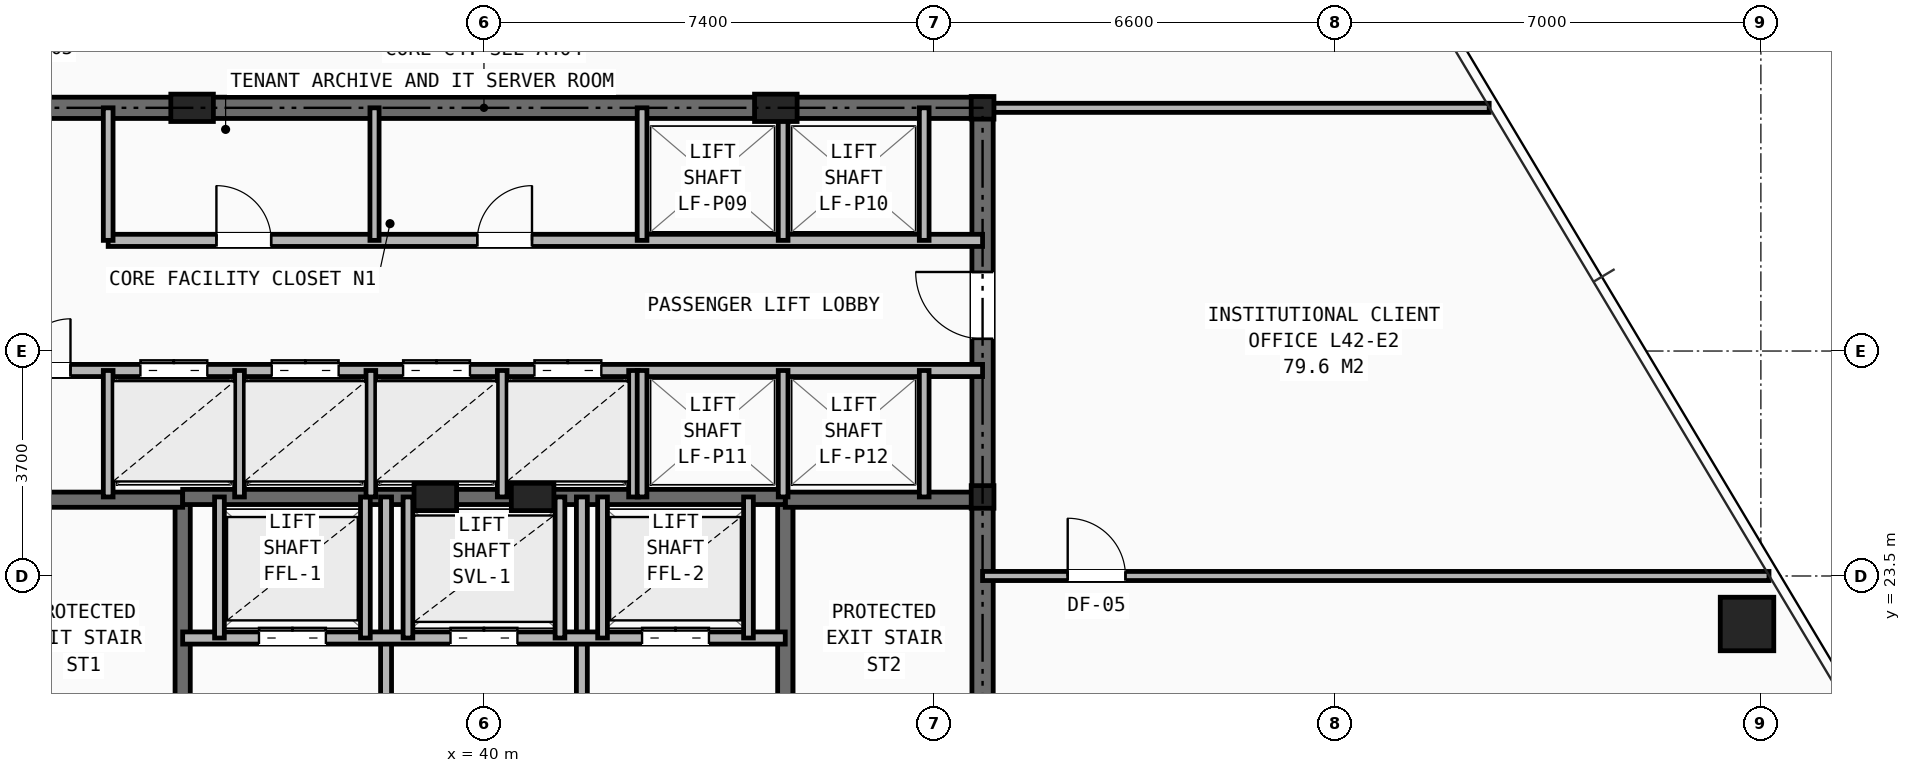
"""IFC4 building model, lengths in metres.
Left out: names, types, materials, properties, quantities, classifications, styles, units other than length and angle.
Written with IfcOpenShell. Run it as: python <this file> out.ifc"""

import sys

from ifc_helpers import new_model, si_unit, direction, frame, frame_2d, origin, origin_2d, place, context, subcontext, project, spatial, rectangle, hollow_rectangle, i_section, extrude, element, fill, save


model = new_model("IFC4")
c1 = context("Model", 3, precision=1e-05, world=origin(), true_north=direction((0.0, 1.0)))
c2 = subcontext(c1, "Body", "Model", "MODEL_VIEW")
j1 = project(units=[si_unit("LENGTHUNIT", "METRE"), si_unit("PLANEANGLEUNIT", "RADIAN")], contexts=[c1])
p1 = place(None, origin())
s1 = spatial("IfcSite", under=j1, at=p1, CompositionType="ELEMENT")
p2 = place(p1, origin())
s2 = spatial("IfcBuilding", under=s1, at=p2, CompositionType="ELEMENT")
p3 = place(p2, frame((0.0, 0.0, 147.05)))
s3 = spatial("IfcBuildingStorey", under=s2, at=p3, CompositionType="ELEMENT", Elevation=147.05)
for number, where, z_axis, x_axis in (
    (1, (48.2, 24.8, 0.0), (0.0, 0.0, 1.0), (1.0, 0.0, 0.0)),
    (2, (48.2, 31.2, 0.0), (0.0, 0.0, 1.0), (1.0, 0.0, 0.0)),
):
    element("IfcColumn", number, at=place(p3, frame(where, z_axis=z_axis, x_axis=x_axis)), inside=s3, PredefinedType="COLUMN", context=c2, shape_type="SweptSolid", body=[
        extrude(i_section(OverallWidth=0.374, OverallDepth=0.372, WebThickness=0.016, FlangeThickness=0.026, at=origin_2d()), origin(), (0.0, 0.0, 1.0), 3.45),
    ])
for number, where, z_axis, x_axis in (
    (3, (35.2, 31.2, 0.0), (0.0, 0.0, 1.0), (1.0, 0.0, 0.0)),
    (4, (44.8, 31.2, 0.0), (0.0, 0.0, 1.0), (1.0, 0.0, 0.0)),
    (5, (39.2, 24.8, 0.0), (0.0, 0.0, 1.0), (1.0, 0.0, 0.0)),
    (6, (40.8, 24.8, 0.0), (0.0, 0.0, 1.0), (1.0, 0.0, 0.0)),
):
    element("IfcColumn", number, at=place(p3, frame(where, z_axis=z_axis, x_axis=x_axis)), inside=s3, PredefinedType="PILASTER", context=c2, shape_type="SweptSolid", body=[
        extrude(rectangle(XDim=0.7, YDim=0.45, at=origin_2d()), origin(), (0.0, 0.0, 1.0), 3.45),
    ])
p4 = place(p3, frame((60.772, 22.711, 0.0), z_axis=(0.0, 0.0, 1.0), x_axis=(1.0, 0.0, 0.0)))
e7 = element("IfcColumn", 7, at=p4, inside=s3, PredefinedType="COLUMN", context=c2, shape_type="SweptSolid", body=[
    extrude(hollow_rectangle(XDim=0.88, YDim=0.88, WallThickness=0.06, at=origin_2d()), origin(), (0.0, 0.0, 1.0), 3.45),
])
p5 = place(p3, frame((31.8, 31.2, 0.0), z_axis=(0.0, 0.0, 1.0), x_axis=(1.0, 0.0, 0.0)))
e8 = element("IfcWall", 8, at=p5, inside=s3, PredefinedType="SHEAR", context=c2, shape_type="SweptSolid", body=[
    extrude(rectangle(XDim=16.4, YDim=0.35, at=frame_2d((8.2, 0.0))), origin(), (0.0, 0.0, 1.0), 3.21),
])
p6 = place(p3, frame((48.2, 16.4, 0.0), z_axis=(0.0, 0.0, 1.0), x_axis=(0.0, 1.0, 0.0)))
e9 = element("IfcWall", 9, at=p6, inside=s3, PredefinedType="SHEAR", context=c2, shape_type="SweptSolid", body=[
    extrude(rectangle(XDim=14.8, YDim=0.35, at=frame_2d((7.4, 0.0))), origin(), (0.0, 0.0, 1.0), 3.21),
])
p7 = place(p6, frame((11.0, 0.0, 0.0)))
e10 = element("IfcOpeningElement", 10, at=p7, cuts=e9, PredefinedType="OPENING", context=c2, shape_type="SweptSolid", body=[
    extrude(rectangle(XDim=1.1, YDim=2.15, at=frame_2d((0.55, 1.075))), frame((0.0, 0.185, 0.0), z_axis=(0.0, -1.0, 0.0), x_axis=(1.0, 0.0, 0.0)), (0.0, 0.0, 1.0), 0.37),
])
p8 = place(p3, frame((35.045, 16.4, 0.0), z_axis=(0.0, 0.0, 1.0), x_axis=(0.0, 1.0, 0.0)))
e11 = element("IfcWall", 11, at=p8, inside=s3, PredefinedType="SHEAR", context=c2, shape_type="SweptSolid", body=[
    extrude(rectangle(XDim=8.4, YDim=0.25, at=frame_2d((4.2, 0.0))), origin(), (0.0, 0.0, 1.0), 3.21),
])
p9 = place(p8, frame((0.45, 0.0, 0.0)))
e12 = element("IfcOpeningElement", 12, at=p9, cuts=e11, PredefinedType="OPENING", context=c2, shape_type="SweptSolid", body=[
    extrude(rectangle(XDim=0.95, YDim=2.1, at=frame_2d((0.475, 1.05))), frame((0.0, 0.135, 0.0), z_axis=(0.0, -1.0, 0.0), x_axis=(1.0, 0.0, 0.0)), (0.0, 0.0, 1.0), 0.27),
])
p10 = place(p3, frame((31.8, 24.755, 0.0), z_axis=(0.0, 0.0, 1.0), x_axis=(1.0, 0.0, 0.0)))
e13 = element("IfcWall", 13, at=p10, inside=s3, PredefinedType="SHEAR", context=c2, shape_type="SweptSolid", body=[
    extrude(rectangle(XDim=3.245, YDim=0.25, at=frame_2d((1.623, 0.0))), origin(), (0.0, 0.0, 1.0), 3.21),
])
p11 = place(p3, frame((44.955, 16.4, 0.0), z_axis=(0.0, 0.0, 1.0), x_axis=(0.0, 1.0, 0.0)))
e14 = element("IfcWall", 14, at=p11, inside=s3, PredefinedType="SHEAR", context=c2, shape_type="SweptSolid", body=[
    extrude(rectangle(XDim=8.4, YDim=0.25, at=frame_2d((4.2, 0.0))), origin(), (0.0, 0.0, 1.0), 3.21),
])
p12 = place(p11, frame((0.45, 0.0, 0.0)))
e15 = element("IfcOpeningElement", 15, at=p12, cuts=e14, PredefinedType="OPENING", context=c2, shape_type="SweptSolid", body=[
    extrude(rectangle(XDim=0.95, YDim=2.1, at=frame_2d((0.475, 1.05))), frame((0.0, 0.135, 0.0), z_axis=(0.0, -1.0, 0.0), x_axis=(1.0, 0.0, 0.0)), (0.0, 0.0, 1.0), 0.27),
])
p13 = place(p3, frame((44.955, 24.755, 0.0), z_axis=(0.0, 0.0, 1.0), x_axis=(1.0, 0.0, 0.0)))
e16 = element("IfcWall", 16, at=p13, inside=s3, PredefinedType="SHEAR", context=c2, shape_type="SweptSolid", body=[
    extrude(rectangle(XDim=3.245, YDim=0.25, at=frame_2d((1.623, 0.0))), origin(), (0.0, 0.0, 1.0), 3.21),
])
p14 = place(p3, frame((35.045, 24.8, 0.0), z_axis=(0.0, 0.0, 1.0), x_axis=(1.0, 0.0, 0.0)))
e17 = element("IfcWall", 17, at=p14, inside=s3, PredefinedType="SHEAR", context=c2, shape_type="SweptSolid", body=[
    extrude(rectangle(XDim=9.91, YDim=0.25, at=frame_2d((4.955, 0.0))), origin(), (0.0, 0.0, 1.0), 3.21),
])
p15 = place(p3, frame((38.39, 16.4, 0.0), z_axis=(0.0, 0.0, 1.0), x_axis=(0.0, 1.0, 0.0)))
e18 = element("IfcWall", 18, at=p15, inside=s3, PredefinedType="PARTITIONING", context=c2, shape_type="SweptSolid", body=[
    extrude(rectangle(XDim=8.4, YDim=0.18, at=frame_2d((4.2, 0.0))), origin(), (0.0, 0.0, 1.0), 2.661),
])
p16 = place(p15, frame((3.85, 0.0, 0.0)))
e19 = element("IfcOpeningElement", 19, at=p16, cuts=e18, PredefinedType="OPENING", context=c2, shape_type="SweptSolid", body=[
    extrude(rectangle(XDim=0.95, YDim=2.1, at=frame_2d((0.475, 1.05))), frame((0.0, 0.1, 0.0), z_axis=(0.0, -1.0, 0.0), x_axis=(1.0, 0.0, 0.0)), (0.0, 0.0, 1.0), 0.2),
])
p17 = place(p3, frame((41.61, 16.4, 0.0), z_axis=(0.0, 0.0, 1.0), x_axis=(0.0, 1.0, 0.0)))
e20 = element("IfcWall", 20, at=p17, inside=s3, PredefinedType="PARTITIONING", context=c2, shape_type="SweptSolid", body=[
    extrude(rectangle(XDim=8.4, YDim=0.18, at=frame_2d((4.2, 0.0))), origin(), (0.0, 0.0, 1.0), 2.661),
])
p18 = place(p3, frame((35.045, 22.48, 0.0), z_axis=(0.0, 0.0, 1.0), x_axis=(1.0, 0.0, 0.0)))
e21 = element("IfcWall", 21, at=p18, inside=s3, PredefinedType="SOLIDWALL", context=c2, shape_type="SweptSolid", body=[
    extrude(rectangle(XDim=9.91, YDim=0.2, at=frame_2d((4.955, 0.0))), origin(), (0.0, 0.0, 1.0), 3.21),
])
p19 = place(p18, frame((1.255, 0.0, 0.0)))
e22 = element("IfcOpeningElement", 22, at=p19, cuts=e21, PredefinedType="OPENING", context=c2, shape_type="SweptSolid", body=[
    extrude(rectangle(XDim=1.1, YDim=2.15, at=frame_2d((0.55, 1.075))), frame((0.0, 0.11, 0.0), z_axis=(0.0, -1.0, 0.0), x_axis=(1.0, 0.0, 0.0)), (0.0, 0.0, 1.0), 0.22),
])
p20 = place(p18, frame((7.555, 0.0, 0.0)))
e23 = element("IfcOpeningElement", 23, at=p20, cuts=e21, PredefinedType="OPENING", context=c2, shape_type="SweptSolid", body=[
    extrude(rectangle(XDim=1.1, YDim=2.15, at=frame_2d((0.55, 1.075))), frame((0.0, 0.11, 0.0), z_axis=(0.0, -1.0, 0.0), x_axis=(1.0, 0.0, 0.0)), (0.0, 0.0, 1.0), 0.22),
])
p21 = place(p18, frame((4.405, 0.0, 0.0)))
e24 = element("IfcOpeningElement", 24, at=p21, cuts=e21, PredefinedType="OPENING", context=c2, shape_type="SweptSolid", body=[
    extrude(rectangle(XDim=1.1, YDim=2.15, at=frame_2d((0.55, 1.075))), frame((0.0, 0.11, 0.0), z_axis=(0.0, -1.0, 0.0), x_axis=(1.0, 0.0, 0.0)), (0.0, 0.0, 1.0), 0.22),
])
for number, where, z_axis, x_axis in (
    (25, (35.65, 22.48, 0.0), (0.0, 0.0, 1.0), (0.0, 1.0, 0.0)),
    (26, (38.05, 22.48, 0.0), (0.0, 0.0, 1.0), (0.0, 1.0, 0.0)),
    (27, (41.95, 22.48, 0.0), (0.0, 0.0, 1.0), (0.0, 1.0, 0.0)),
    (28, (44.35, 22.48, 0.0), (0.0, 0.0, 1.0), (0.0, 1.0, 0.0)),
    (29, (38.75, 22.48, 0.0), (0.0, 0.0, 1.0), (0.0, 1.0, 0.0)),
    (30, (41.25, 22.48, 0.0), (0.0, 0.0, 1.0), (0.0, 1.0, 0.0)),
):
    element("IfcWall", number, at=place(p3, frame(where, z_axis=z_axis, x_axis=x_axis)), inside=s3, PredefinedType="SOLIDWALL", context=c2, shape_type="SweptSolid", body=[
        extrude(rectangle(XDim=2.32, YDim=0.16, at=frame_2d((1.16, 0.0))), origin(), (0.0, 0.0, 1.0), 3.21),
    ])
p22 = place(p3, frame((33.82, 29.02, 0.0), z_axis=(0.0, 0.0, 1.0), x_axis=(1.0, 0.0, 0.0)))
e31 = element("IfcWall", 31, at=p22, inside=s3, PredefinedType="SOLIDWALL", context=c2, shape_type="SweptSolid", body=[
    extrude(rectangle(XDim=14.38, YDim=0.2, at=frame_2d((7.19, 0.0))), origin(), (0.0, 0.0, 1.0), 2.661),
])
p23 = place(p22, frame((1.78, 0.0, 0.0)))
e32 = element("IfcOpeningElement", 32, at=p23, cuts=e31, PredefinedType="OPENING", context=c2, shape_type="SweptSolid", body=[
    extrude(rectangle(XDim=0.9, YDim=2.1, at=frame_2d((0.45, 1.05))), frame((0.0, 0.11, 0.0), z_axis=(0.0, -1.0, 0.0), x_axis=(1.0, 0.0, 0.0)), (0.0, 0.0, 1.0), 0.22),
])
p24 = place(p22, frame((6.07, 0.0, 0.0)))
e33 = element("IfcOpeningElement", 33, at=p24, cuts=e31, PredefinedType="OPENING", context=c2, shape_type="SweptSolid", body=[
    extrude(rectangle(XDim=0.9, YDim=2.1, at=frame_2d((0.45, 1.05))), frame((0.0, 0.11, 0.0), z_axis=(0.0, -1.0, 0.0), x_axis=(1.0, 0.0, 0.0)), (0.0, 0.0, 1.0), 0.22),
])
p25 = place(p3, frame((31.8, 26.88, 0.0), z_axis=(0.0, 0.0, 1.0), x_axis=(1.0, 0.0, 0.0)))
e34 = element("IfcWall", 34, at=p25, inside=s3, PredefinedType="SOLIDWALL", context=c2, shape_type="SweptSolid", body=[
    extrude(rectangle(XDim=16.4, YDim=0.2, at=frame_2d((8.2, 0.0))), origin(), (0.0, 0.0, 1.0), 2.661),
])
p26 = place(p25, frame((0.55, 0.0, 0.0)))
e35 = element("IfcOpeningElement", 35, at=p26, cuts=e34, PredefinedType="OPENING", context=c2, shape_type="SweptSolid", body=[
    extrude(rectangle(XDim=0.85, YDim=2.05, at=frame_2d((0.425, 1.025))), frame((0.0, 0.11, 0.0), z_axis=(0.0, -1.0, 0.0), x_axis=(1.0, 0.0, 0.0)), (0.0, 0.0, 1.0), 0.22),
])
p27 = place(p25, frame((2.55, 0.0, 0.0)))
e36 = element("IfcOpeningElement", 36, at=p27, cuts=e34, PredefinedType="OPENING", context=c2, shape_type="SweptSolid", body=[
    extrude(rectangle(XDim=1.1, YDim=2.15, at=frame_2d((0.55, 1.075))), frame((0.0, 0.11, 0.0), z_axis=(0.0, -1.0, 0.0), x_axis=(1.0, 0.0, 0.0)), (0.0, 0.0, 1.0), 0.22),
])
p28 = place(p25, frame((4.71, 0.0, 0.0)))
e37 = element("IfcOpeningElement", 37, at=p28, cuts=e34, PredefinedType="OPENING", context=c2, shape_type="SweptSolid", body=[
    extrude(rectangle(XDim=1.1, YDim=2.15, at=frame_2d((0.55, 1.075))), frame((0.0, 0.11, 0.0), z_axis=(0.0, -1.0, 0.0), x_axis=(1.0, 0.0, 0.0)), (0.0, 0.0, 1.0), 0.22),
])
p29 = place(p25, frame((6.87, 0.0, 0.0)))
e38 = element("IfcOpeningElement", 38, at=p29, cuts=e34, PredefinedType="OPENING", context=c2, shape_type="SweptSolid", body=[
    extrude(rectangle(XDim=1.1, YDim=2.15, at=frame_2d((0.55, 1.075))), frame((0.0, 0.11, 0.0), z_axis=(0.0, -1.0, 0.0), x_axis=(1.0, 0.0, 0.0)), (0.0, 0.0, 1.0), 0.22),
])
p30 = place(p25, frame((9.03, 0.0, 0.0)))
e39 = element("IfcOpeningElement", 39, at=p30, cuts=e34, PredefinedType="OPENING", context=c2, shape_type="SweptSolid", body=[
    extrude(rectangle(XDim=1.1, YDim=2.15, at=frame_2d((0.55, 1.075))), frame((0.0, 0.11, 0.0), z_axis=(0.0, -1.0, 0.0), x_axis=(1.0, 0.0, 0.0)), (0.0, 0.0, 1.0), 0.22),
])
p31 = place(p3, frame((33.82, 29.02, 0.0), z_axis=(0.0, 0.0, 1.0), x_axis=(0.0, 1.0, 0.0)))
e40 = element("IfcWall", 40, at=p31, inside=s3, PredefinedType="SOLIDWALL", context=c2, shape_type="SweptSolid", body=[
    extrude(rectangle(XDim=2.18, YDim=0.16, at=frame_2d((1.09, 0.0))), origin(), (0.0, 0.0, 1.0), 2.661),
])
p32 = place(p3, frame((33.82, 24.8, 0.0), z_axis=(0.0, 0.0, 1.0), x_axis=(0.0, 1.0, 0.0)))
e41 = element("IfcWall", 41, at=p32, inside=s3, PredefinedType="SOLIDWALL", context=c2, shape_type="SweptSolid", body=[
    extrude(rectangle(XDim=2.08, YDim=0.16, at=frame_2d((1.04, 0.0))), origin(), (0.0, 0.0, 1.0), 3.21),
])
p33 = place(p3, frame((38.2, 29.02, 0.0), z_axis=(0.0, 0.0, 1.0), x_axis=(0.0, 1.0, 0.0)))
e42 = element("IfcWall", 42, at=p33, inside=s3, PredefinedType="PARTITIONING", context=c2, shape_type="SweptSolid", body=[
    extrude(rectangle(XDim=2.18, YDim=0.15, at=frame_2d((1.09, 0.0))), origin(), (0.0, 0.0, 1.0), 2.661),
])
for number, where, z_axis, x_axis in (
    (43, (35.98, 24.8, 0.0), (0.0, 0.0, 1.0), (0.0, 1.0, 0.0)),
    (44, (38.14, 24.8, 0.0), (0.0, 0.0, 1.0), (0.0, 1.0, 0.0)),
    (45, (40.3, 24.8, 0.0), (0.0, 0.0, 1.0), (0.0, 1.0, 0.0)),
    (46, (42.46, 24.8, 0.0), (0.0, 0.0, 1.0), (0.0, 1.0, 0.0)),
):
    element("IfcWall", number, at=place(p3, frame(where, z_axis=z_axis, x_axis=x_axis)), inside=s3, PredefinedType="SOLIDWALL", context=c2, shape_type="SweptSolid", body=[
        extrude(rectangle(XDim=2.08, YDim=0.16, at=frame_2d((1.04, 0.0))), origin(), (0.0, 0.0, 1.0), 3.21),
    ])
for number, where, z_axis, x_axis in (
    (47, (42.6, 29.02, 0.0), (0.0, 0.0, 1.0), (0.0, 1.0, 0.0)),
    (48, (44.92, 29.02, 0.0), (0.0, 0.0, 1.0), (0.0, 1.0, 0.0)),
    (49, (47.24, 29.02, 0.0), (0.0, 0.0, 1.0), (0.0, 1.0, 0.0)),
):
    element("IfcWall", number, at=place(p3, frame(where, z_axis=z_axis, x_axis=x_axis)), inside=s3, PredefinedType="SOLIDWALL", context=c2, shape_type="SweptSolid", body=[
        extrude(rectangle(XDim=2.18, YDim=0.16, at=frame_2d((1.09, 0.0))), origin(), (0.0, 0.0, 1.0), 2.661),
    ])
for number, where, z_axis, x_axis in (
    (50, (42.6, 24.8, 0.0), (0.0, 0.0, 1.0), (0.0, 1.0, 0.0)),
    (51, (44.92, 24.8, 0.0), (0.0, 0.0, 1.0), (0.0, 1.0, 0.0)),
    (52, (47.24, 24.8, 0.0), (0.0, 0.0, 1.0), (0.0, 1.0, 0.0)),
):
    element("IfcWall", number, at=place(p3, frame(where, z_axis=z_axis, x_axis=x_axis)), inside=s3, PredefinedType="SOLIDWALL", context=c2, shape_type="SweptSolid", body=[
        extrude(rectangle(XDim=2.08, YDim=0.16, at=frame_2d((1.04, 0.0))), origin(), (0.0, 0.0, 1.0), 3.21),
    ])
p34 = place(p3, frame((48.2, 31.2, 0.0), z_axis=(0.0, 0.0, 1.0), x_axis=(1.0, 0.0, 0.0)))
e53 = element("IfcWall", 53, at=p34, inside=s3, PredefinedType="PARTITIONING", context=c2, shape_type="SweptSolid", body=[
    extrude(rectangle(XDim=8.332, YDim=0.15, at=frame_2d((4.166, 0.0))), origin(), (0.0, 0.0, 1.0), 2.225),
])
p35 = place(p3, frame((48.2, 23.5, 0.0), z_axis=(0.0, 0.0, 1.0), x_axis=(1.0, 0.0, 0.0)))
e54 = element("IfcWall", 54, at=p35, inside=s3, PredefinedType="PARTITIONING", context=c2, shape_type="SweptSolid", body=[
    extrude(rectangle(XDim=12.933, YDim=0.15, at=frame_2d((6.467, 0.0))), origin(), (0.0, 0.0, 1.0), 2.589),
])
p36 = place(p35, frame((1.4, 0.0, 0.0)))
e55 = element("IfcOpeningElement", 55, at=p36, cuts=e54, PredefinedType="OPENING", context=c2, shape_type="SweptSolid", body=[
    extrude(rectangle(XDim=0.95, YDim=2.1, at=frame_2d((0.475, 1.05))), frame((0.0, 0.085, 0.0), z_axis=(0.0, -1.0, 0.0), x_axis=(1.0, 0.0, 0.0)), (0.0, 0.0, 1.0), 0.17),
])
p37 = place(p19, origin())
e56 = element("IfcDoor", 56, at=p37, inside=s3, OperationType="DOUBLE_DOOR_SLIDING", PredefinedType="DOOR", context=c2, shape_type="SweptSolid", body=[
    extrude(rectangle(XDim=1.1, YDim=2.15, at=frame_2d((0.55, 1.075))), frame((0.0, 0.025, 0.0), z_axis=(0.0, -1.0, 0.0), x_axis=(1.0, 0.0, 0.0)), (0.0, 0.0, 1.0), 0.05),
])
fill(e22, e56)
p38 = place(p20, origin())
e57 = element("IfcDoor", 57, at=p38, inside=s3, OperationType="DOUBLE_DOOR_SLIDING", PredefinedType="DOOR", context=c2, shape_type="SweptSolid", body=[
    extrude(rectangle(XDim=1.1, YDim=2.15, at=frame_2d((0.55, 1.075))), frame((0.0, 0.025, 0.0), z_axis=(0.0, -1.0, 0.0), x_axis=(1.0, 0.0, 0.0)), (0.0, 0.0, 1.0), 0.05),
])
fill(e23, e57)
p39 = place(p21, origin())
e58 = element("IfcDoor", 58, at=p39, inside=s3, OperationType="DOUBLE_DOOR_SLIDING", PredefinedType="DOOR", context=c2, shape_type="SweptSolid", body=[
    extrude(rectangle(XDim=1.1, YDim=2.15, at=frame_2d((0.55, 1.075))), frame((0.0, 0.025, 0.0), z_axis=(0.0, -1.0, 0.0), x_axis=(1.0, 0.0, 0.0)), (0.0, 0.0, 1.0), 0.05),
])
fill(e24, e58)
p40 = place(p26, origin())
e59 = element("IfcDoor", 59, at=p40, inside=s3, OperationType="SINGLE_SWING_RIGHT", PredefinedType="DOOR", context=c2, shape_type="SweptSolid", body=[
    extrude(rectangle(XDim=0.85, YDim=2.05, at=frame_2d((0.425, 1.025))), frame((0.0, 0.025, 0.0), z_axis=(0.0, -1.0, 0.0), x_axis=(1.0, 0.0, 0.0)), (0.0, 0.0, 1.0), 0.05),
])
fill(e35, e59)
p41 = place(p7, origin())
e60 = element("IfcDoor", 60, at=p41, inside=s3, OperationType="SINGLE_SWING_RIGHT", PredefinedType="DOOR", context=c2, shape_type="SweptSolid", body=[
    extrude(rectangle(XDim=1.1, YDim=2.15, at=frame_2d((0.55, 1.075))), frame((0.0, 0.025, 0.0), z_axis=(0.0, -1.0, 0.0), x_axis=(1.0, 0.0, 0.0)), (0.0, 0.0, 1.0), 0.05),
])
fill(e10, e60)
p42 = place(p23, origin())
e61 = element("IfcDoor", 61, at=p42, inside=s3, OperationType="SINGLE_SWING_LEFT", PredefinedType="DOOR", context=c2, shape_type="SweptSolid", body=[
    extrude(rectangle(XDim=0.9, YDim=2.1, at=frame_2d((0.45, 1.05))), frame((0.0, 0.025, 0.0), z_axis=(0.0, -1.0, 0.0), x_axis=(1.0, 0.0, 0.0)), (0.0, 0.0, 1.0), 0.05),
])
fill(e32, e61)
p43 = place(p24, origin())
e62 = element("IfcDoor", 62, at=p43, inside=s3, OperationType="SINGLE_SWING_RIGHT", PredefinedType="DOOR", context=c2, shape_type="SweptSolid", body=[
    extrude(rectangle(XDim=0.9, YDim=2.1, at=frame_2d((0.45, 1.05))), frame((0.0, 0.025, 0.0), z_axis=(0.0, -1.0, 0.0), x_axis=(1.0, 0.0, 0.0)), (0.0, 0.0, 1.0), 0.05),
])
fill(e33, e62)
p44 = place(p27, origin())
e63 = element("IfcDoor", 63, at=p44, inside=s3, OperationType="DOUBLE_DOOR_SLIDING", PredefinedType="DOOR", context=c2, shape_type="SweptSolid", body=[
    extrude(rectangle(XDim=1.1, YDim=2.15, at=frame_2d((0.55, 1.075))), frame((0.0, 0.025, 0.0), z_axis=(0.0, -1.0, 0.0), x_axis=(1.0, 0.0, 0.0)), (0.0, 0.0, 1.0), 0.05),
])
fill(e36, e63)
p45 = place(p28, origin())
e64 = element("IfcDoor", 64, at=p45, inside=s3, OperationType="DOUBLE_DOOR_SLIDING", PredefinedType="DOOR", context=c2, shape_type="SweptSolid", body=[
    extrude(rectangle(XDim=1.1, YDim=2.15, at=frame_2d((0.55, 1.075))), frame((0.0, 0.025, 0.0), z_axis=(0.0, -1.0, 0.0), x_axis=(1.0, 0.0, 0.0)), (0.0, 0.0, 1.0), 0.05),
])
fill(e37, e64)
p46 = place(p29, origin())
e65 = element("IfcDoor", 65, at=p46, inside=s3, OperationType="DOUBLE_DOOR_SLIDING", PredefinedType="DOOR", context=c2, shape_type="SweptSolid", body=[
    extrude(rectangle(XDim=1.1, YDim=2.15, at=frame_2d((0.55, 1.075))), frame((0.0, 0.025, 0.0), z_axis=(0.0, -1.0, 0.0), x_axis=(1.0, 0.0, 0.0)), (0.0, 0.0, 1.0), 0.05),
])
fill(e38, e65)
p47 = place(p30, origin())
e66 = element("IfcDoor", 66, at=p47, inside=s3, OperationType="DOUBLE_DOOR_SLIDING", PredefinedType="DOOR", context=c2, shape_type="SweptSolid", body=[
    extrude(rectangle(XDim=1.1, YDim=2.15, at=frame_2d((0.55, 1.075))), frame((0.0, 0.025, 0.0), z_axis=(0.0, -1.0, 0.0), x_axis=(1.0, 0.0, 0.0)), (0.0, 0.0, 1.0), 0.05),
])
fill(e39, e66)
p48 = place(p36, origin())
e67 = element("IfcDoor", 67, at=p48, inside=s3, OperationType="SINGLE_SWING_LEFT", PredefinedType="DOOR", context=c2, shape_type="SweptSolid", body=[
    extrude(rectangle(XDim=0.95, YDim=2.1, at=frame_2d((0.475, 1.05))), frame((0.0, 0.025, 0.0), z_axis=(0.0, -1.0, 0.0), x_axis=(1.0, 0.0, 0.0)), (0.0, 0.0, 1.0), 0.05),
])
fill(e55, e67)
save(model, sys.argv[1])
